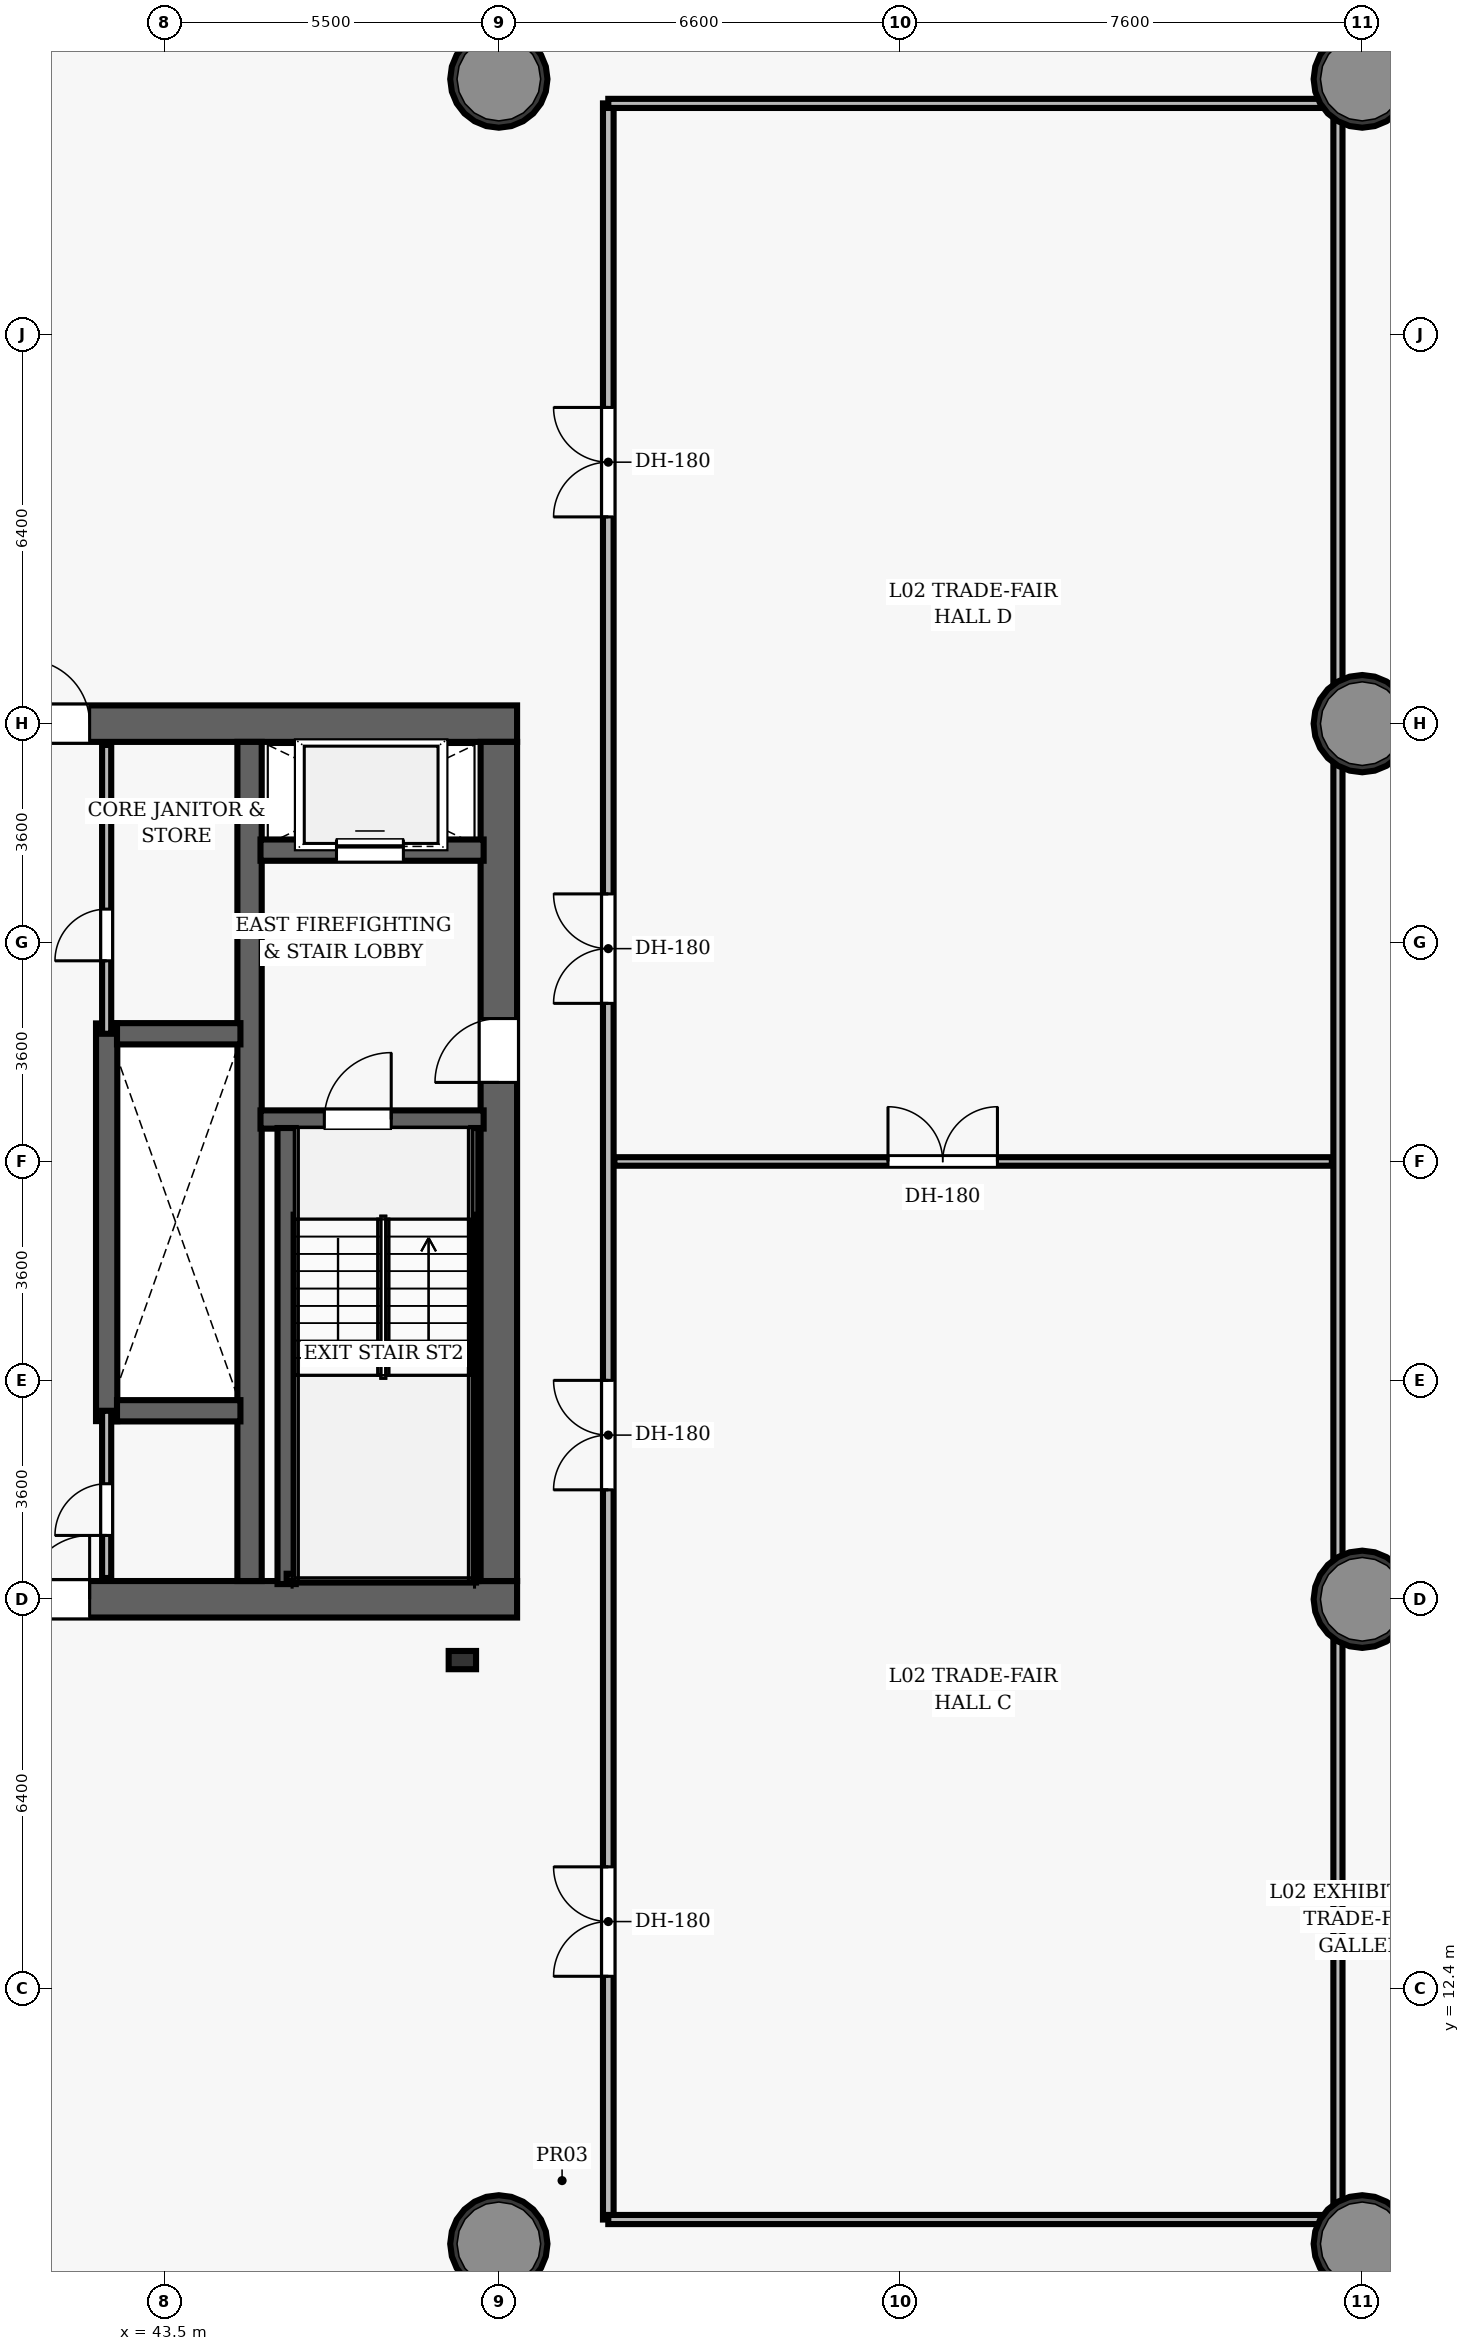
"""IFC4 building model, lengths in metres.
Left out: names, types, materials, properties, quantities, classifications, styles, units other than length and angle.
Written with IfcOpenShell. Run it as: python <this file> out.ifc"""

import sys

from ifc_helpers import new_model, si_unit, direction, frame, frame_2d, origin, origin_2d, place, context, subcontext, project, spatial, rectangle, hollow_circle, extrude, element, fill, save


model = new_model("IFC4")
c1 = context("Model", 3, precision=1e-05, world=origin(), true_north=direction((0.0, 1.0)))
c2 = subcontext(c1, "Body", "Model", "MODEL_VIEW")
j1 = project(units=[si_unit("LENGTHUNIT", "METRE"), si_unit("PLANEANGLEUNIT", "RADIAN")], contexts=[c1])
p1 = place(None, origin())
s1 = spatial("IfcSite", under=j1, at=p1, CompositionType="ELEMENT")
p2 = place(p1, origin())
s2 = spatial("IfcBuilding", under=s1, at=p2, CompositionType="ELEMENT")
p3 = place(p2, frame((0.0, 0.0, 12.0)))
s3 = spatial("IfcBuildingStorey", under=s2, at=p3, CompositionType="ELEMENT", Elevation=12.0)
p4 = place(p3, frame((26.7, 18.8, 0.0), z_axis=(0.0, 0.0, 1.0), x_axis=(1.0, 0.0, 0.0)))
e1 = element("IfcWall", 1, at=p4, inside=s3, PredefinedType="SHEAR", context=c2, shape_type="SweptSolid", body=[
    extrude(rectangle(XDim=22.6, YDim=0.6, at=frame_2d((11.3, 0.0))), origin(), (0.0, 0.0, 1.0), 6.6),
])
p5 = place(p4, frame((14.52, 0.0, 0.0)))
e2 = element("IfcOpeningElement", 2, at=p5, cuts=e1, PredefinedType="OPENING", context=c2, shape_type="SweptSolid", body=[
    extrude(rectangle(XDim=1.05, YDim=2.15, at=frame_2d((0.525, 1.075))), frame((0.0, 0.31, 0.0), z_axis=(0.0, -1.0, 0.0), x_axis=(1.0, 0.0, 0.0)), (0.0, 0.0, 1.0), 0.62),
])
p6 = place(p3, frame((26.7, 33.2, 0.0), z_axis=(0.0, 0.0, 1.0), x_axis=(1.0, 0.0, 0.0)))
e3 = element("IfcWall", 3, at=p6, inside=s3, PredefinedType="SHEAR", context=c2, shape_type="SweptSolid", body=[
    extrude(rectangle(XDim=22.6, YDim=0.6, at=frame_2d((11.3, 0.0))), origin(), (0.0, 0.0, 1.0), 6.6),
])
p7 = place(p6, frame((4.62, 0.0, 0.0)))
e4 = element("IfcOpeningElement", 4, at=p7, cuts=e3, PredefinedType="OPENING", context=c2, shape_type="SweptSolid", body=[
    extrude(rectangle(XDim=1.05, YDim=2.15, at=frame_2d((0.525, 1.075))), frame((0.0, 0.31, 0.0), z_axis=(0.0, -1.0, 0.0), x_axis=(1.0, 0.0, 0.0)), (0.0, 0.0, 1.0), 0.62),
])
p8 = place(p6, frame((14.52, 0.0, 0.0)))
e5 = element("IfcOpeningElement", 5, at=p8, cuts=e3, PredefinedType="OPENING", context=c2, shape_type="SweptSolid", body=[
    extrude(rectangle(XDim=1.05, YDim=2.15, at=frame_2d((0.525, 1.075))), frame((0.0, 0.31, 0.0), z_axis=(0.0, -1.0, 0.0), x_axis=(1.0, 0.0, 0.0)), (0.0, 0.0, 1.0), 0.62),
])
p9 = place(p3, frame((49.0, 19.1, 0.0), z_axis=(0.0, 0.0, 1.0), x_axis=(0.0, 1.0, 0.0)))
e6 = element("IfcWall", 6, at=p9, inside=s3, PredefinedType="SHEAR", context=c2, shape_type="SweptSolid", body=[
    extrude(rectangle(XDim=13.8, YDim=0.6, at=frame_2d((6.9, 0.0))), origin(), (0.0, 0.0, 1.0), 6.6),
])
p10 = place(p9, frame((8.2, 0.0, 0.0)))
e7 = element("IfcOpeningElement", 7, at=p10, cuts=e6, PredefinedType="OPENING", context=c2, shape_type="SweptSolid", body=[
    extrude(rectangle(XDim=1.05, YDim=2.15, at=frame_2d((0.525, 1.075))), frame((0.0, 0.31, 0.0), z_axis=(0.0, -1.0, 0.0), x_axis=(1.0, 0.0, 0.0)), (0.0, 0.0, 1.0), 0.62),
])
p11 = place(p3, frame((44.9, 19.1, 0.0), z_axis=(0.0, 0.0, 1.0), x_axis=(0.0, 1.0, 0.0)))
e8 = element("IfcWall", 8, at=p11, inside=s3, PredefinedType="SHEAR", context=c2, shape_type="SweptSolid", body=[
    extrude(rectangle(XDim=13.8, YDim=0.4, at=frame_2d((6.9, 0.0))), origin(), (0.0, 0.0, 1.0), 6.6),
])
for number, where, z_axis, x_axis in (
    (9, (49.0, 8.2, 0.0), (0.0, 0.0, 1.0), (1.0, 0.0, 0.0)),
    (10, (63.2, 8.2, 0.0), (0.0, 0.0, 1.0), (1.0, 0.0, 0.0)),
    (11, (63.2, 18.8, 0.0), (0.0, 0.0, 1.0), (1.0, 0.0, 0.0)),
    (12, (63.2, 33.2, 0.0), (0.0, 0.0, 1.0), (1.0, 0.0, 0.0)),
    (13, (49.0, 43.8, 0.0), (0.0, 0.0, 1.0), (1.0, 0.0, 0.0)),
    (14, (63.2, 43.8, 0.0), (0.0, 0.0, 1.0), (1.0, 0.0, 0.0)),
):
    element("IfcColumn", number, at=place(p3, frame(where, z_axis=z_axis, x_axis=x_axis)), inside=s3, PredefinedType="COLUMN", context=c2, shape_type="SweptSolid", body=[
        extrude(hollow_circle(Radius=0.8, WallThickness=0.06, at=origin_2d()), origin(), (0.0, 0.0, 1.0), 6.6),
    ])
p12 = place(p3, frame((45.08, 26.69, 0.0), z_axis=(0.0, 0.0, 1.0), x_axis=(1.0, 0.0, 0.0)))
e15 = element("IfcWall", 15, at=p12, inside=s3, PredefinedType="SHEAR", context=c2, shape_type="SweptSolid", body=[
    extrude(rectangle(XDim=3.67, YDim=0.3, at=frame_2d((1.835, 0.0))), origin(), (0.0, 0.0, 1.0), 6.6),
])
p13 = place(p12, frame((1.05, 0.0, 0.0)))
e16 = element("IfcOpeningElement", 16, at=p13, cuts=e15, PredefinedType="OPENING", context=c2, shape_type="SweptSolid", body=[
    extrude(rectangle(XDim=1.1, YDim=2.15, at=frame_2d((0.55, 1.075))), frame((0.0, 0.16, 0.0), z_axis=(0.0, -1.0, 0.0), x_axis=(1.0, 0.0, 0.0)), (0.0, 0.0, 1.0), 0.32),
])
p14 = place(p3, frame((45.51, 19.05, 0.0), z_axis=(0.0, 0.0, 1.0), x_axis=(0.0, 1.0, 0.0)))
e17 = element("IfcWall", 17, at=p14, inside=s3, PredefinedType="SHEAR", context=c2, shape_type="SweptSolid", body=[
    extrude(rectangle(XDim=7.5, YDim=0.3, at=frame_2d((3.75, 0.0))), origin(), (0.0, 0.0, 1.0), 6.6),
])
p15 = place(p3, frame((48.605, 19.1, 0.0), z_axis=(0.0, 0.0, 1.0), x_axis=(0.0, 1.0, 0.0)))
e18 = element("IfcWall", 18, at=p15, inside=s3, PredefinedType="SHEAR", context=c2, shape_type="SweptSolid", body=[
    extrude(rectangle(XDim=7.45, YDim=0.12, at=frame_2d((3.725, 0.0))), origin(), (0.0, 0.0, 1.0), 6.6),
])
p16 = place(p3, frame((45.51, 19.16, 0.0), z_axis=(0.0, 0.0, 1.0), x_axis=(1.0, 0.0, 0.0)))
e19 = element("IfcWall", 19, at=p16, inside=s3, PredefinedType="SHEAR", context=c2, shape_type="SweptSolid", body=[
    extrude(rectangle(XDim=3.095, YDim=0.12, at=frame_2d((1.547, 0.0))), origin(), (0.0, 0.0, 1.0), 6.6),
])
p17 = place(p3, frame((45.08, 31.12, 0.0), z_axis=(0.0, 0.0, 1.0), x_axis=(1.0, 0.0, 0.0)))
e20 = element("IfcWall", 20, at=p17, inside=s3, PredefinedType="SHEAR", context=c2, shape_type="SweptSolid", body=[
    extrude(rectangle(XDim=3.67, YDim=0.35, at=frame_2d((1.835, 0.0))), origin(), (0.0, 0.0, 1.0), 5.31),
])
p18 = place(p17, frame((1.25, 0.0, 0.0)))
e21 = element("IfcOpeningElement", 21, at=p18, cuts=e20, PredefinedType="OPENING", context=c2, shape_type="SweptSolid", body=[
    extrude(rectangle(XDim=1.1, YDim=2.15, at=frame_2d((0.55, 1.075))), frame((0.0, 0.185, 0.0), z_axis=(0.0, -1.0, 0.0), x_axis=(1.0, 0.0, 0.0)), (0.0, 0.0, 1.0), 0.37),
])
p19 = place(p3, frame((42.55, 21.73, 0.0), z_axis=(0.0, 0.0, 1.0), x_axis=(0.0, 1.0, 0.0)))
e22 = element("IfcWall", 22, at=p19, inside=s3, PredefinedType="SHEAR", context=c2, shape_type="SweptSolid", body=[
    extrude(rectangle(XDim=6.54, YDim=0.35, at=frame_2d((3.27, 0.0))), origin(), (0.0, 0.0, 1.0), 5.31),
])
for number, where, z_axis, x_axis in (
    (23, (42.72, 21.9, 0.0), (0.0, 0.0, 1.0), (1.0, 0.0, 0.0)),
    (24, (42.72, 28.1, 0.0), (0.0, 0.0, 1.0), (1.0, 0.0, 0.0)),
):
    element("IfcWall", number, at=place(p3, frame(where, z_axis=z_axis, x_axis=x_axis)), inside=s3, PredefinedType="SHEAR", context=c2, shape_type="SweptSolid", body=[
        extrude(rectangle(XDim=2.03, YDim=0.35, at=frame_2d((1.015, 0.0))), origin(), (0.0, 0.0, 1.0), 5.31),
    ])
p20 = place(p3, frame((42.55, 28.1, 0.0), z_axis=(0.0, 0.0, 1.0), x_axis=(0.0, 1.0, 0.0)))
e25 = element("IfcWall", 25, at=p20, inside=s3, PredefinedType="PARTITIONING", context=c2, shape_type="SweptSolid", body=[
    extrude(rectangle(XDim=4.75, YDim=0.15, at=frame_2d((2.375, 0.0))), origin(), (0.0, 0.0, 1.0), 5.31),
])
p21 = place(p20, frame((1.2, 0.0, 0.0)))
e26 = element("IfcOpeningElement", 26, at=p21, cuts=e25, PredefinedType="OPENING", context=c2, shape_type="SweptSolid", body=[
    extrude(rectangle(XDim=0.85, YDim=2.1, at=frame_2d((0.425, 1.05))), frame((0.0, 0.085, 0.0), z_axis=(0.0, -1.0, 0.0), x_axis=(1.0, 0.0, 0.0)), (0.0, 0.0, 1.0), 0.17),
])
p22 = place(p3, frame((42.55, 19.15, 0.0), z_axis=(0.0, 0.0, 1.0), x_axis=(0.0, 1.0, 0.0)))
e27 = element("IfcWall", 27, at=p22, inside=s3, PredefinedType="PARTITIONING", context=c2, shape_type="SweptSolid", body=[
    extrude(rectangle(XDim=2.75, YDim=0.15, at=frame_2d((1.375, 0.0))), origin(), (0.0, 0.0, 1.0), 5.31),
])
p23 = place(p22, frame((0.7, 0.0, 0.0)))
e28 = element("IfcOpeningElement", 28, at=p23, cuts=e27, PredefinedType="OPENING", context=c2, shape_type="SweptSolid", body=[
    extrude(rectangle(XDim=0.85, YDim=2.1, at=frame_2d((0.425, 1.05))), frame((0.0, 0.085, 0.0), z_axis=(0.0, -1.0, 0.0), x_axis=(1.0, 0.0, 0.0)), (0.0, 0.0, 1.0), 0.17),
])
p24 = place(p3, frame((48.4, 17.8, 0.0), z_axis=(0.0, 0.0, 1.0), x_axis=(1.0, 0.0, 0.0)))
e29 = element("IfcColumn", 29, at=p24, inside=s3, PredefinedType="PILASTER", context=c2, shape_type="SweptSolid", body=[
    extrude(rectangle(XDim=0.45, YDim=0.3, at=origin_2d()), origin(), (0.0, 0.0, 1.0), 6.6),
])
p25 = place(p3, frame((50.8, 8.6, 0.0), z_axis=(0.0, 0.0, 1.0), x_axis=(0.0, 1.0, 0.0)))
e30 = element("IfcWall", 30, at=p25, inside=s3, PredefinedType="PARTITIONING", context=c2, shape_type="SweptSolid", body=[
    extrude(rectangle(XDim=34.8, YDim=0.175, at=frame_2d((17.4, 0.0))), origin(), (0.0, 0.0, 1.0), 5.31),
])
p26 = place(p25, frame((4.0, 0.0, 0.0)))
e31 = element("IfcOpeningElement", 31, at=p26, cuts=e30, PredefinedType="OPENING", context=c2, shape_type="SweptSolid", body=[
    extrude(rectangle(XDim=1.8, YDim=2.35, at=frame_2d((0.9, 1.175))), frame((0.0, 0.097, 0.0), z_axis=(0.0, -1.0, 0.0), x_axis=(1.0, 0.0, 0.0)), (0.0, 0.0, 1.0), 0.195),
])
p27 = place(p25, frame((12.0, 0.0, 0.0)))
e32 = element("IfcOpeningElement", 32, at=p27, cuts=e30, PredefinedType="OPENING", context=c2, shape_type="SweptSolid", body=[
    extrude(rectangle(XDim=1.8, YDim=2.35, at=frame_2d((0.9, 1.175))), frame((0.0, 0.097, 0.0), z_axis=(0.0, -1.0, 0.0), x_axis=(1.0, 0.0, 0.0)), (0.0, 0.0, 1.0), 0.195),
])
p28 = place(p25, frame((20.0, 0.0, 0.0)))
e33 = element("IfcOpeningElement", 33, at=p28, cuts=e30, PredefinedType="OPENING", context=c2, shape_type="SweptSolid", body=[
    extrude(rectangle(XDim=1.8, YDim=2.35, at=frame_2d((0.9, 1.175))), frame((0.0, 0.097, 0.0), z_axis=(0.0, -1.0, 0.0), x_axis=(1.0, 0.0, 0.0)), (0.0, 0.0, 1.0), 0.195),
])
p29 = place(p25, frame((28.0, 0.0, 0.0)))
e34 = element("IfcOpeningElement", 34, at=p29, cuts=e30, PredefinedType="OPENING", context=c2, shape_type="SweptSolid", body=[
    extrude(rectangle(XDim=1.8, YDim=2.35, at=frame_2d((0.9, 1.175))), frame((0.0, 0.097, 0.0), z_axis=(0.0, -1.0, 0.0), x_axis=(1.0, 0.0, 0.0)), (0.0, 0.0, 1.0), 0.195),
])
for number, where, z_axis, x_axis in (
    (35, (50.8, 8.6, 0.0), (0.0, 0.0, 1.0), (1.0, 0.0, 0.0)),
    (36, (50.8, 43.4, 0.0), (0.0, 0.0, 1.0), (1.0, 0.0, 0.0)),
):
    element("IfcWall", number, at=place(p3, frame(where, z_axis=z_axis, x_axis=x_axis)), inside=s3, PredefinedType="PARTITIONING", context=c2, shape_type="SweptSolid", body=[
        extrude(rectangle(XDim=12.0, YDim=0.15, at=frame_2d((6.0, 0.0))), origin(), (0.0, 0.0, 1.0), 5.31),
    ])
p30 = place(p3, frame((62.8, 8.6, 0.0), z_axis=(0.0, 0.0, 1.0), x_axis=(0.0, 1.0, 0.0)))
e37 = element("IfcWall", 37, at=p30, inside=s3, PredefinedType="PARTITIONING", context=c2, shape_type="SweptSolid", body=[
    extrude(rectangle(XDim=34.8, YDim=0.15, at=frame_2d((17.4, 0.0))), origin(), (0.0, 0.0, 1.0), 5.31),
])
p31 = place(p3, frame((50.9, 26.0, 0.0), z_axis=(0.0, 0.0, 1.0), x_axis=(1.0, 0.0, 0.0)))
e38 = element("IfcWall", 38, at=p31, inside=s3, PredefinedType="MOVABLE", context=c2, shape_type="SweptSolid", body=[
    extrude(rectangle(XDim=11.8, YDim=0.14, at=frame_2d((5.9, 0.0))), origin(), (0.0, 0.0, 1.0), 5.31),
])
p32 = place(p31, frame((4.5, 0.0, 0.0)))
e39 = element("IfcOpeningElement", 39, at=p32, cuts=e38, PredefinedType="OPENING", context=c2, shape_type="SweptSolid", body=[
    extrude(rectangle(XDim=1.8, YDim=2.35, at=frame_2d((0.9, 1.175))), frame((0.0, 0.08, 0.0), z_axis=(0.0, -1.0, 0.0), x_axis=(1.0, 0.0, 0.0)), (0.0, 0.0, 1.0), 0.16),
])
p33 = place(p13, origin())
e40 = element("IfcDoor", 40, at=p33, inside=s3, OperationType="SINGLE_SWING_RIGHT", PredefinedType="DOOR", context=c2, shape_type="SweptSolid", body=[
    extrude(rectangle(XDim=1.1, YDim=2.15, at=frame_2d((0.55, 1.075))), frame((0.0, 0.025, 0.0), z_axis=(0.0, -1.0, 0.0), x_axis=(1.0, 0.0, 0.0)), (0.0, 0.0, 1.0), 0.05),
])
fill(e16, e40)
p34 = place(p10, origin())
e41 = element("IfcDoor", 41, at=p34, inside=s3, OperationType="SINGLE_SWING_LEFT", PredefinedType="DOOR", context=c2, shape_type="SweptSolid", body=[
    extrude(rectangle(XDim=1.05, YDim=2.15, at=frame_2d((0.525, 1.075))), frame((0.0, 0.025, 0.0), z_axis=(0.0, -1.0, 0.0), x_axis=(1.0, 0.0, 0.0)), (0.0, 0.0, 1.0), 0.05),
])
fill(e7, e41)
p35 = place(p8, origin())
e42 = element("IfcDoor", 42, at=p35, inside=s3, OperationType="SINGLE_SWING_LEFT", PredefinedType="DOOR", context=c2, shape_type="SweptSolid", body=[
    extrude(rectangle(XDim=1.05, YDim=2.15, at=frame_2d((0.525, 1.075))), frame((0.0, 0.025, 0.0), z_axis=(0.0, -1.0, 0.0), x_axis=(1.0, 0.0, 0.0)), (0.0, 0.0, 1.0), 0.05),
])
fill(e5, e42)
p36 = place(p5, origin())
e43 = element("IfcDoor", 43, at=p36, inside=s3, OperationType="SINGLE_SWING_RIGHT", PredefinedType="DOOR", context=c2, shape_type="SweptSolid", body=[
    extrude(rectangle(XDim=1.05, YDim=2.15, at=frame_2d((0.525, 1.075))), frame((0.0, 0.025, 0.0), z_axis=(0.0, -1.0, 0.0), x_axis=(1.0, 0.0, 0.0)), (0.0, 0.0, 1.0), 0.05),
])
fill(e2, e43)
p37 = place(p21, origin())
e44 = element("IfcDoor", 44, at=p37, inside=s3, OperationType="SINGLE_SWING_LEFT", PredefinedType="DOOR", context=c2, shape_type="SweptSolid", body=[
    extrude(rectangle(XDim=0.85, YDim=2.1, at=frame_2d((0.425, 1.05))), frame((0.0, 0.025, 0.0), z_axis=(0.0, -1.0, 0.0), x_axis=(1.0, 0.0, 0.0)), (0.0, 0.0, 1.0), 0.05),
])
fill(e26, e44)
p38 = place(p23, origin())
e45 = element("IfcDoor", 45, at=p38, inside=s3, OperationType="SINGLE_SWING_LEFT", PredefinedType="DOOR", context=c2, shape_type="SweptSolid", body=[
    extrude(rectangle(XDim=0.85, YDim=2.1, at=frame_2d((0.425, 1.05))), frame((0.0, 0.025, 0.0), z_axis=(0.0, -1.0, 0.0), x_axis=(1.0, 0.0, 0.0)), (0.0, 0.0, 1.0), 0.05),
])
fill(e28, e45)
p39 = place(p32, origin())
e46 = element("IfcDoor", 46, at=p39, inside=s3, OperationType="DOUBLE_DOOR_SINGLE_SWING", PredefinedType="DOOR", context=c2, shape_type="SweptSolid", body=[
    extrude(rectangle(XDim=1.8, YDim=2.35, at=frame_2d((0.9, 1.175))), frame((0.0, 0.025, 0.0), z_axis=(0.0, -1.0, 0.0), x_axis=(1.0, 0.0, 0.0)), (0.0, 0.0, 1.0), 0.05),
])
fill(e39, e46)
p40 = place(p26, origin())
e47 = element("IfcDoor", 47, at=p40, inside=s3, OperationType="DOUBLE_DOOR_SINGLE_SWING", PredefinedType="DOOR", context=c2, shape_type="SweptSolid", body=[
    extrude(rectangle(XDim=1.8, YDim=2.35, at=frame_2d((0.9, 1.175))), frame((0.0, 0.025, 0.0), z_axis=(0.0, -1.0, 0.0), x_axis=(1.0, 0.0, 0.0)), (0.0, 0.0, 1.0), 0.05),
])
fill(e31, e47)
p41 = place(p27, origin())
e48 = element("IfcDoor", 48, at=p41, inside=s3, OperationType="DOUBLE_DOOR_SINGLE_SWING", PredefinedType="DOOR", context=c2, shape_type="SweptSolid", body=[
    extrude(rectangle(XDim=1.8, YDim=2.35, at=frame_2d((0.9, 1.175))), frame((0.0, 0.025, 0.0), z_axis=(0.0, -1.0, 0.0), x_axis=(1.0, 0.0, 0.0)), (0.0, 0.0, 1.0), 0.05),
])
fill(e32, e48)
p42 = place(p28, origin())
e49 = element("IfcDoor", 49, at=p42, inside=s3, OperationType="DOUBLE_DOOR_SINGLE_SWING", PredefinedType="DOOR", context=c2, shape_type="SweptSolid", body=[
    extrude(rectangle(XDim=1.8, YDim=2.35, at=frame_2d((0.9, 1.175))), frame((0.0, 0.025, 0.0), z_axis=(0.0, -1.0, 0.0), x_axis=(1.0, 0.0, 0.0)), (0.0, 0.0, 1.0), 0.05),
])
fill(e33, e49)
p43 = place(p29, origin())
e50 = element("IfcDoor", 50, at=p43, inside=s3, OperationType="DOUBLE_DOOR_SINGLE_SWING", PredefinedType="DOOR", context=c2, shape_type="SweptSolid", body=[
    extrude(rectangle(XDim=1.8, YDim=2.35, at=frame_2d((0.9, 1.175))), frame((0.0, 0.025, 0.0), z_axis=(0.0, -1.0, 0.0), x_axis=(1.0, 0.0, 0.0)), (0.0, 0.0, 1.0), 0.05),
])
fill(e34, e50)
p44 = place(p18, origin())
e51 = element("IfcDoor", 51, at=p44, inside=s3, OperationType="SLIDING_TO_LEFT", PredefinedType="DOOR", context=c2, shape_type="SweptSolid", body=[
    extrude(rectangle(XDim=1.1, YDim=2.15, at=frame_2d((0.55, 1.075))), frame((0.0, 0.025, 0.0), z_axis=(0.0, -1.0, 0.0), x_axis=(1.0, 0.0, 0.0)), (0.0, 0.0, 1.0), 0.05),
])
fill(e21, e51)
save(model, sys.argv[1])
